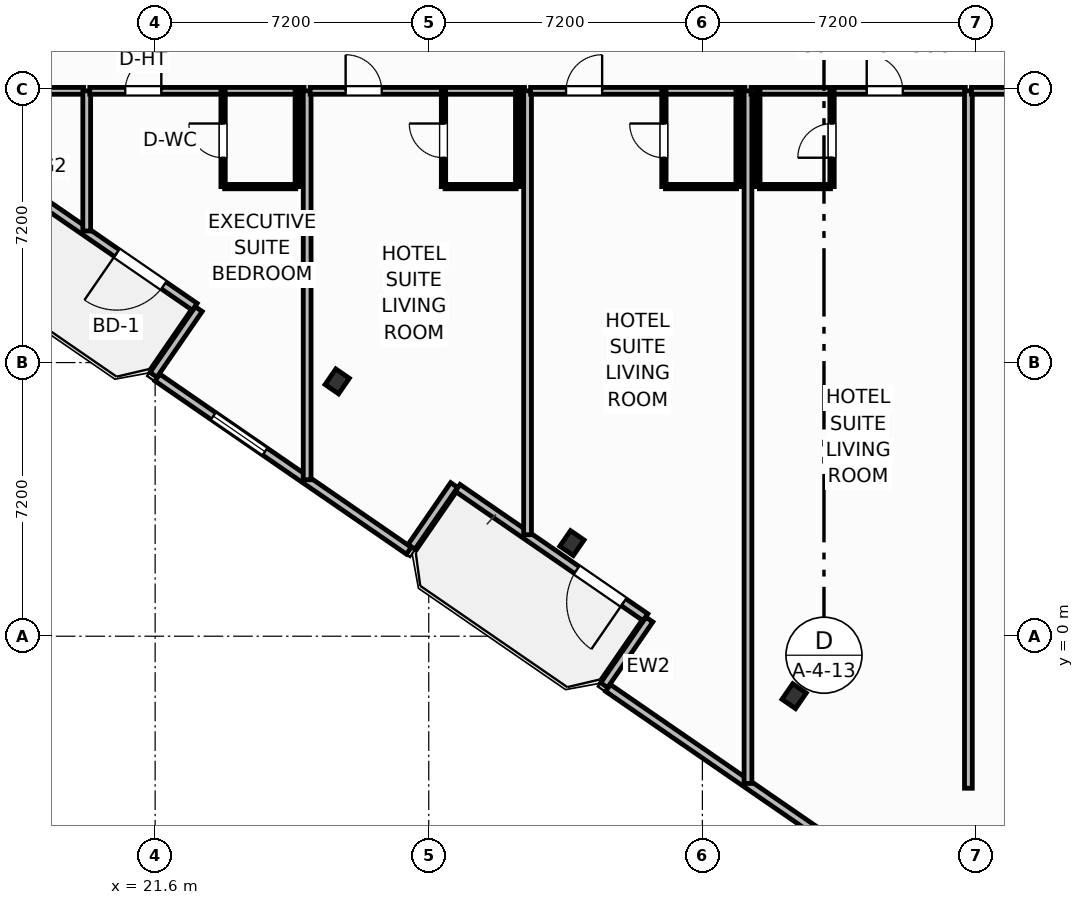
"""IFC4 building model, lengths in metres.
Left out: names, types, materials, properties, quantities, classifications, styles, units other than length and angle.
Written with IfcOpenShell. Run it as: python <this file> out.ifc"""

import sys

from ifc_helpers import new_model, si_unit, direction, frame, frame_2d, origin, origin_2d, place, context, subcontext, project, spatial, rectangle, i_section, extrude, element, fill, save


model = new_model("IFC4")
c1 = context("Model", 3, precision=1e-05, world=origin(), true_north=direction((0.0, 1.0)))
c2 = subcontext(c1, "Body", "Model", "MODEL_VIEW")
j1 = project(units=[si_unit("LENGTHUNIT", "METRE"), si_unit("PLANEANGLEUNIT", "RADIAN")], contexts=[c1])
p1 = place(None, origin())
s1 = spatial("IfcSite", under=j1, at=p1, CompositionType="ELEMENT")
p2 = place(p1, origin())
s2 = spatial("IfcBuilding", under=s1, at=p2, CompositionType="ELEMENT")
p3 = place(p2, frame((0.0, 0.0, 64.0)))
s3 = spatial("IfcBuildingStorey", under=s2, at=p3, CompositionType="ELEMENT", Elevation=64.0)
for number, where, z_axis, x_axis in (
    (1, (26.391, 6.705, 0.0), (0.0, 0.0, 1.0), (0.824, -0.567, 0.0)),
    (2, (32.568, 2.45, 0.0), (0.0, 0.0, 1.0), (0.824, -0.567, 0.0)),
    (3, (38.415, -1.577, 0.0), (0.0, 0.0, 1.0), (0.824, -0.567, 0.0)),
):
    element("IfcColumn", number, at=place(p3, frame(where, z_axis=z_axis, x_axis=x_axis)), inside=s3, PredefinedType="COLUMN", context=c2, shape_type="SweptSolid", body=[
        extrude(i_section(OverallWidth=0.432, OverallDepth=0.498, WebThickness=0.056, FlangeThickness=0.089, FilletRadius=0.025, at=origin_2d()), origin(), (0.0, 0.0, 1.0), 3.7),
    ])
p4 = place(p3, frame((22.643, 8.667, 0.0), z_axis=(0.0, 0.0, 1.0), x_axis=(-0.823534636215, 0.567265989598, 0.0)))
e4 = element("IfcWall", 4, at=p4, inside=s3, PredefinedType="SOLIDWALL", context=c2, shape_type="SweptSolid", body=[
    extrude(rectangle(XDim=6.0, YDim=0.22, at=frame_2d((3.0, 0.0))), origin(), (0.0, 0.0, 1.0), 2.73),
])
p5 = place(p4, frame((0.992, 0.0, 0.0)))
e5 = element("IfcOpeningElement", 5, at=p5, cuts=e4, PredefinedType="OPENING", context=c2, shape_type="SweptSolid", body=[
    extrude(rectangle(XDim=1.5, YDim=2.25, at=frame_2d((0.75, 1.125))), frame((0.0, 0.12, 0.0), z_axis=(0.0, -1.0, 0.0), x_axis=(1.0, 0.0, 0.0)), (0.0, 0.0, 1.0), 0.24),
])
p6 = place(p3, frame((34.502, 0.499, 0.0), z_axis=(0.0, 0.0, 1.0), x_axis=(-0.823534636215, 0.567265989598, 0.0)))
e6 = element("IfcWall", 6, at=p6, inside=s3, PredefinedType="SOLIDWALL", context=c2, shape_type="SweptSolid", body=[
    extrude(rectangle(XDim=6.0, YDim=0.22, at=frame_2d((3.0, 0.0))), origin(), (0.0, 0.0, 1.0), 2.73),
])
p7 = place(p6, frame((0.696, 0.0, 0.0)))
e7 = element("IfcOpeningElement", 7, at=p7, cuts=e6, PredefinedType="OPENING", context=c2, shape_type="SweptSolid", body=[
    extrude(rectangle(XDim=1.5, YDim=2.25, at=frame_2d((0.75, 1.125))), frame((0.0, 0.12, 0.0), z_axis=(0.0, -1.0, 0.0), x_axis=(1.0, 0.0, 0.0)), (0.0, 0.0, 1.0), 0.24),
])
p8 = place(p3, frame((22.747, 8.607, 0.0), z_axis=(0.0, 0.0, 1.0), x_axis=(-0.567219383419, -0.823566737474, 0.0)))
e8 = element("IfcWall", 8, at=p8, inside=s3, PredefinedType="SOLIDWALL", context=c2, shape_type="SweptSolid", body=[
    extrude(rectangle(XDim=2.1, YDim=0.22, at=frame_2d((1.05, 0.0))), origin(), (0.0, 0.0, 1.0), 2.73),
])
p9 = place(p3, frame((21.659, 6.807, 0.0), z_axis=(0.0, 0.0, 1.0), x_axis=(0.823535360023, -0.567264938799, 0.0)))
e9 = element("IfcWall", 9, at=p9, inside=s3, PredefinedType="SOLIDWALL", context=c2, shape_type="SweptSolid", body=[
    extrude(rectangle(XDim=8.035, YDim=0.22, at=frame_2d((4.018, 0.0))), origin(), (0.0, 0.0, 1.0), 2.73),
])
p10 = place(p9, frame((1.788, 0.0, 0.8)))
e10 = element("IfcOpeningElement", 10, at=p10, cuts=e9, PredefinedType="OPENING", context=c2, shape_type="SweptSolid", body=[
    extrude(rectangle(XDim=1.65, YDim=1.65, at=frame_2d((0.825, 0.825))), frame((0.0, 0.12, 0.0), z_axis=(0.0, -1.0, 0.0), x_axis=(1.0, 0.0, 0.0)), (0.0, 0.0, 1.0), 0.24),
])
p11 = place(p3, frame((28.347, 2.352, 0.0), z_axis=(0.0, 0.0, 1.0), x_axis=(0.567215821234, 0.823569190865, 0.0)))
e11 = element("IfcWall", 11, at=p11, inside=s3, PredefinedType="SOLIDWALL", context=c2, shape_type="SweptSolid", body=[
    extrude(rectangle(XDim=1.975, YDim=0.22, at=frame_2d((0.988, 0.0))), origin(), (0.0, 0.0, 1.0), 2.73),
])
p12 = place(p3, frame((34.606, 0.439, 0.0), z_axis=(0.0, 0.0, 1.0), x_axis=(-0.567219383419, -0.823566737474, 0.0)))
e12 = element("IfcWall", 12, at=p12, inside=s3, PredefinedType="SOLIDWALL", context=c2, shape_type="SweptSolid", body=[
    extrude(rectangle(XDim=2.1, YDim=0.22, at=frame_2d((1.05, 0.0))), origin(), (0.0, 0.0, 1.0), 2.73),
])
p13 = place(p3, frame((33.518, -1.362, 0.0), z_axis=(0.0, 0.0, 1.0), x_axis=(0.82353935489, -0.567259139148, 0.0)))
e13 = element("IfcWall", 13, at=p13, inside=s3, PredefinedType="SOLIDWALL", context=c2, shape_type="SweptSolid", body=[
    extrude(rectangle(XDim=23.147, YDim=0.22, at=frame_2d((11.573, 0.0))), origin(), (0.0, 0.0, 1.0), 2.73),
])
p14 = place(p13, frame((10.749, 0.0, 0.8)))
e14 = element("IfcOpeningElement", 14, at=p14, cuts=e13, PredefinedType="OPENING", context=c2, shape_type="SweptSolid", body=[
    extrude(rectangle(XDim=1.65, YDim=1.65, at=frame_2d((0.825, 0.825))), frame((0.0, 0.12, 0.0), z_axis=(0.0, -1.0, 0.0), x_axis=(1.0, 0.0, 0.0)), (0.0, 0.0, 1.0), 0.24),
])
p15 = place(p3, frame((14.08, 14.35, 0.0), z_axis=(0.0, 0.0, 1.0), x_axis=(1.0, 0.0, 0.0)))
e15 = element("IfcWall", 15, at=p15, inside=s3, PredefinedType="PARTITIONING", context=c2, shape_type="SweptSolid", body=[
    extrude(rectangle(XDim=5.64, YDim=0.18, at=frame_2d((2.82, 0.0))), origin(), (0.0, 0.0, 1.0), 3.45),
])
p16 = place(p15, frame((3.195, 0.0, 0.0)))
e16 = element("IfcOpeningElement", 16, at=p16, cuts=e15, PredefinedType="OPENING", context=c2, shape_type="SweptSolid", body=[
    extrude(rectangle(XDim=0.95, YDim=2.05, at=frame_2d((0.475, 1.025))), frame((0.0, 0.1, 0.0), z_axis=(0.0, -1.0, 0.0), x_axis=(1.0, 0.0, 0.0)), (0.0, 0.0, 1.0), 0.2),
])
p17 = place(p3, frame((19.8, 10.662, 0.0), z_axis=(0.0, 0.0, 1.0), x_axis=(0.0, 1.0, 0.0)))
e17 = element("IfcWall", 17, at=p17, inside=s3, PredefinedType="PARTITIONING", context=c2, shape_type="SweptSolid", body=[
    extrude(rectangle(XDim=3.688, YDim=0.205, at=frame_2d((1.844, 0.0))), origin(), (0.0, 0.0, 1.0), 3.45),
])
p18 = place(p3, frame((19.88, 14.35, 0.0), z_axis=(0.0, 0.0, 1.0), x_axis=(1.0, 0.0, 0.0)))
e18 = element("IfcWall", 18, at=p18, inside=s3, PredefinedType="PARTITIONING", context=c2, shape_type="SweptSolid", body=[
    extrude(rectangle(XDim=5.64, YDim=0.18, at=frame_2d((2.82, 0.0))), origin(), (0.0, 0.0, 1.0), 3.45),
])
p19 = place(p18, frame((0.933, 0.0, 0.0)))
e19 = element("IfcOpeningElement", 19, at=p19, cuts=e18, PredefinedType="OPENING", context=c2, shape_type="SweptSolid", body=[
    extrude(rectangle(XDim=0.95, YDim=2.15, at=frame_2d((0.475, 1.075))), frame((0.0, 0.1, 0.0), z_axis=(0.0, -1.0, 0.0), x_axis=(1.0, 0.0, 0.0)), (0.0, 0.0, 1.0), 0.2),
])
p20 = place(p3, frame((23.428, 11.83, 0.0), z_axis=(0.0, 0.0, 1.0), x_axis=(1.0, 0.0, 0.0)))
e20 = element("IfcWall", 20, at=p20, inside=s3, PredefinedType="PARTITIONING", context=c2, shape_type="SweptSolid", body=[
    extrude(rectangle(XDim=1.872, YDim=0.115, at=frame_2d((0.936, 0.0))), origin(), (0.0, 0.0, 1.0), 3.45),
])
p21 = place(p3, frame((23.388, 11.83, 0.0), z_axis=(0.0, 0.0, 1.0), x_axis=(0.0, 1.0, 0.0)))
e21 = element("IfcWall", 21, at=p21, inside=s3, PredefinedType="PARTITIONING", context=c2, shape_type="SweptSolid", body=[
    extrude(rectangle(XDim=2.52, YDim=0.115, at=frame_2d((1.26, 0.0))), origin(), (0.0, 0.0, 1.0), 3.45),
])
p22 = place(p21, frame((0.76, 0.0, 0.0)))
e22 = element("IfcOpeningElement", 22, at=p22, cuts=e21, PredefinedType="OPENING", context=c2, shape_type="SweptSolid", body=[
    extrude(rectangle(XDim=0.9, YDim=2.05, at=frame_2d((0.45, 1.025))), frame((0.0, 0.067, 0.0), z_axis=(0.0, -1.0, 0.0), x_axis=(1.0, 0.0, 0.0)), (0.0, 0.0, 1.0), 0.135),
])
p23 = place(p3, frame((25.34, 11.83, 0.0), z_axis=(0.0, 0.0, 1.0), x_axis=(0.0, 1.0, 0.0)))
e23 = element("IfcWall", 23, at=p23, inside=s3, PredefinedType="PARTITIONING", context=c2, shape_type="SweptSolid", body=[
    extrude(rectangle(XDim=2.52, YDim=0.115, at=frame_2d((1.26, 0.0))), origin(), (0.0, 0.0, 1.0), 2.58),
])
p24 = place(p3, frame((25.6, 4.117, 0.0), z_axis=(0.0, 0.0, 1.0), x_axis=(0.0, 1.0, 0.0)))
e24 = element("IfcWall", 24, at=p24, inside=s3, PredefinedType="PARTITIONING", context=c2, shape_type="SweptSolid", body=[
    extrude(rectangle(XDim=10.233, YDim=0.205, at=frame_2d((5.117, 0.0))), origin(), (0.0, 0.0, 1.0), 2.58),
])
p25 = place(p3, frame((25.68, 14.35, 0.0), z_axis=(0.0, 0.0, 1.0), x_axis=(1.0, 0.0, 0.0)))
e25 = element("IfcWall", 25, at=p25, inside=s3, PredefinedType="PARTITIONING", context=c2, shape_type="SweptSolid", body=[
    extrude(rectangle(XDim=5.64, YDim=0.18, at=frame_2d((2.82, 0.0))), origin(), (0.0, 0.0, 1.0), 3.45),
])
p26 = place(p25, frame((0.933, 0.0, 0.0)))
e26 = element("IfcOpeningElement", 26, at=p26, cuts=e25, PredefinedType="OPENING", context=c2, shape_type="SweptSolid", body=[
    extrude(rectangle(XDim=0.95, YDim=2.15, at=frame_2d((0.475, 1.075))), frame((0.0, 0.1, 0.0), z_axis=(0.0, -1.0, 0.0), x_axis=(1.0, 0.0, 0.0)), (0.0, 0.0, 1.0), 0.2),
])
p27 = place(p3, frame((29.228, 11.83, 0.0), z_axis=(0.0, 0.0, 1.0), x_axis=(1.0, 0.0, 0.0)))
e27 = element("IfcWall", 27, at=p27, inside=s3, PredefinedType="PARTITIONING", context=c2, shape_type="SweptSolid", body=[
    extrude(rectangle(XDim=1.872, YDim=0.115, at=frame_2d((0.936, 0.0))), origin(), (0.0, 0.0, 1.0), 3.45),
])
p28 = place(p3, frame((29.188, 11.83, 0.0), z_axis=(0.0, 0.0, 1.0), x_axis=(0.0, 1.0, 0.0)))
e28 = element("IfcWall", 28, at=p28, inside=s3, PredefinedType="PARTITIONING", context=c2, shape_type="SweptSolid", body=[
    extrude(rectangle(XDim=2.52, YDim=0.115, at=frame_2d((1.26, 0.0))), origin(), (0.0, 0.0, 1.0), 3.45),
])
p29 = place(p28, frame((0.76, 0.0, 0.0)))
e29 = element("IfcOpeningElement", 29, at=p29, cuts=e28, PredefinedType="OPENING", context=c2, shape_type="SweptSolid", body=[
    extrude(rectangle(XDim=0.9, YDim=2.05, at=frame_2d((0.45, 1.025))), frame((0.0, 0.067, 0.0), z_axis=(0.0, -1.0, 0.0), x_axis=(1.0, 0.0, 0.0)), (0.0, 0.0, 1.0), 0.135),
])
p30 = place(p3, frame((31.14, 11.83, 0.0), z_axis=(0.0, 0.0, 1.0), x_axis=(0.0, 1.0, 0.0)))
e30 = element("IfcWall", 30, at=p30, inside=s3, PredefinedType="PARTITIONING", context=c2, shape_type="SweptSolid", body=[
    extrude(rectangle(XDim=2.52, YDim=0.115, at=frame_2d((1.26, 0.0))), origin(), (0.0, 0.0, 1.0), 3.45),
])
p31 = place(p3, frame((31.4, 2.671, 0.0), z_axis=(0.0, 0.0, 1.0), x_axis=(0.0, 1.0, 0.0)))
e31 = element("IfcWall", 31, at=p31, inside=s3, PredefinedType="PARTITIONING", context=c2, shape_type="SweptSolid", body=[
    extrude(rectangle(XDim=11.679, YDim=0.205, at=frame_2d((5.839, 0.0))), origin(), (0.0, 0.0, 1.0), 3.45),
])
p32 = place(p3, frame((31.48, 14.35, 0.0), z_axis=(0.0, 0.0, 1.0), x_axis=(1.0, 0.0, 0.0)))
e32 = element("IfcWall", 32, at=p32, inside=s3, PredefinedType="PARTITIONING", context=c2, shape_type="SweptSolid", body=[
    extrude(rectangle(XDim=5.64, YDim=0.18, at=frame_2d((2.82, 0.0))), origin(), (0.0, 0.0, 1.0), 3.45),
])
p33 = place(p32, frame((0.933, 0.0, 0.0)))
e33 = element("IfcOpeningElement", 33, at=p33, cuts=e32, PredefinedType="OPENING", context=c2, shape_type="SweptSolid", body=[
    extrude(rectangle(XDim=0.95, YDim=2.15, at=frame_2d((0.475, 1.075))), frame((0.0, 0.1, 0.0), z_axis=(0.0, -1.0, 0.0), x_axis=(1.0, 0.0, 0.0)), (0.0, 0.0, 1.0), 0.2),
])
p34 = place(p3, frame((35.028, 11.83, 0.0), z_axis=(0.0, 0.0, 1.0), x_axis=(1.0, 0.0, 0.0)))
e34 = element("IfcWall", 34, at=p34, inside=s3, PredefinedType="PARTITIONING", context=c2, shape_type="SweptSolid", body=[
    extrude(rectangle(XDim=1.872, YDim=0.115, at=frame_2d((0.936, 0.0))), origin(), (0.0, 0.0, 1.0), 3.45),
])
p35 = place(p3, frame((34.988, 11.83, 0.0), z_axis=(0.0, 0.0, 1.0), x_axis=(0.0, 1.0, 0.0)))
e35 = element("IfcWall", 35, at=p35, inside=s3, PredefinedType="PARTITIONING", context=c2, shape_type="SweptSolid", body=[
    extrude(rectangle(XDim=2.52, YDim=0.115, at=frame_2d((1.26, 0.0))), origin(), (0.0, 0.0, 1.0), 3.45),
])
p36 = place(p35, frame((0.76, 0.0, 0.0)))
e36 = element("IfcOpeningElement", 36, at=p36, cuts=e35, PredefinedType="OPENING", context=c2, shape_type="SweptSolid", body=[
    extrude(rectangle(XDim=0.9, YDim=2.05, at=frame_2d((0.45, 1.025))), frame((0.0, 0.067, 0.0), z_axis=(0.0, -1.0, 0.0), x_axis=(1.0, 0.0, 0.0)), (0.0, 0.0, 1.0), 0.135),
])
p37 = place(p3, frame((36.94, 11.83, 0.0), z_axis=(0.0, 0.0, 1.0), x_axis=(0.0, 1.0, 0.0)))
e37 = element("IfcWall", 37, at=p37, inside=s3, PredefinedType="PARTITIONING", context=c2, shape_type="SweptSolid", body=[
    extrude(rectangle(XDim=2.52, YDim=0.115, at=frame_2d((1.26, 0.0))), origin(), (0.0, 0.0, 1.0), 3.45),
])
p38 = place(p3, frame((37.2, -3.874, 0.0), z_axis=(0.0, 0.0, 1.0), x_axis=(0.0, 1.0, 0.0)))
e38 = element("IfcWall", 38, at=p38, inside=s3, PredefinedType="PARTITIONING", context=c2, shape_type="SweptSolid", body=[
    extrude(rectangle(XDim=18.224, YDim=0.205, at=frame_2d((9.112, 0.0))), origin(), (0.0, 0.0, 1.0), 3.45),
])
p39 = place(p3, frame((37.28, 14.35, 0.0), z_axis=(0.0, 0.0, 1.0), x_axis=(1.0, 0.0, 0.0)))
e39 = element("IfcWall", 39, at=p39, inside=s3, PredefinedType="PARTITIONING", context=c2, shape_type="SweptSolid", body=[
    extrude(rectangle(XDim=5.64, YDim=0.18, at=frame_2d((2.82, 0.0))), origin(), (0.0, 0.0, 1.0), 3.45),
])
p40 = place(p39, frame((3.045, 0.0, 0.0)))
e40 = element("IfcOpeningElement", 40, at=p40, cuts=e39, PredefinedType="OPENING", context=c2, shape_type="SweptSolid", body=[
    extrude(rectangle(XDim=0.95, YDim=2.15, at=frame_2d((0.475, 1.075))), frame((0.0, 0.1, 0.0), z_axis=(0.0, -1.0, 0.0), x_axis=(1.0, 0.0, 0.0)), (0.0, 0.0, 1.0), 0.2),
])
p41 = place(p3, frame((37.5, 11.83, 0.0), z_axis=(0.0, 0.0, 1.0), x_axis=(1.0, 0.0, 0.0)))
e41 = element("IfcWall", 41, at=p41, inside=s3, PredefinedType="PARTITIONING", context=c2, shape_type="SweptSolid", body=[
    extrude(rectangle(XDim=1.872, YDim=0.115, at=frame_2d((0.936, 0.0))), origin(), (0.0, 0.0, 1.0), 3.45),
])
p42 = place(p3, frame((39.412, 11.83, 0.0), z_axis=(0.0, 0.0, 1.0), x_axis=(0.0, 1.0, 0.0)))
e42 = element("IfcWall", 42, at=p42, inside=s3, PredefinedType="PARTITIONING", context=c2, shape_type="SweptSolid", body=[
    extrude(rectangle(XDim=2.52, YDim=0.115, at=frame_2d((1.26, 0.0))), origin(), (0.0, 0.0, 1.0), 3.45),
])
p43 = place(p42, frame((0.76, 0.0, 0.0)))
e43 = element("IfcOpeningElement", 43, at=p43, cuts=e42, PredefinedType="OPENING", context=c2, shape_type="SweptSolid", body=[
    extrude(rectangle(XDim=0.9, YDim=2.05, at=frame_2d((0.45, 1.025))), frame((0.0, 0.067, 0.0), z_axis=(0.0, -1.0, 0.0), x_axis=(1.0, 0.0, 0.0)), (0.0, 0.0, 1.0), 0.135),
])
p44 = place(p3, frame((37.46, 11.83, 0.0), z_axis=(0.0, 0.0, 1.0), x_axis=(0.0, 1.0, 0.0)))
e44 = element("IfcWall", 44, at=p44, inside=s3, PredefinedType="PARTITIONING", context=c2, shape_type="SweptSolid", body=[
    extrude(rectangle(XDim=2.52, YDim=0.115, at=frame_2d((1.26, 0.0))), origin(), (0.0, 0.0, 1.0), 3.45),
])
p45 = place(p3, frame((43.0, -4.0, 0.0), z_axis=(0.0, 0.0, 1.0), x_axis=(0.0, 1.0, 0.0)))
e45 = element("IfcWall", 45, at=p45, inside=s3, PredefinedType="PARTITIONING", context=c2, shape_type="SweptSolid", body=[
    extrude(rectangle(XDim=18.35, YDim=0.205, at=frame_2d((9.175, 0.0))), origin(), (0.0, 0.0, 1.0), 2.58),
])
p46 = place(p3, frame((43.08, 14.35, 0.0), z_axis=(0.0, 0.0, 1.0), x_axis=(1.0, 0.0, 0.0)))
e46 = element("IfcWall", 46, at=p46, inside=s3, PredefinedType="PARTITIONING", context=c2, shape_type="SweptSolid", body=[
    extrude(rectangle(XDim=5.64, YDim=0.18, at=frame_2d((2.82, 0.0))), origin(), (0.0, 0.0, 1.0), 3.45),
])
p47 = place(p46, frame((0.933, 0.0, 0.0)))
e47 = element("IfcOpeningElement", 47, at=p47, cuts=e46, PredefinedType="OPENING", context=c2, shape_type="SweptSolid", body=[
    extrude(rectangle(XDim=0.95, YDim=2.15, at=frame_2d((0.475, 1.075))), frame((0.0, 0.1, 0.0), z_axis=(0.0, -1.0, 0.0), x_axis=(1.0, 0.0, 0.0)), (0.0, 0.0, 1.0), 0.2),
])
p48 = place(p5, origin())
e48 = element("IfcDoor", 48, at=p48, inside=s3, OperationType="SINGLE_SWING_RIGHT", PredefinedType="DOOR", context=c2, shape_type="SweptSolid", body=[
    extrude(rectangle(XDim=1.5, YDim=2.25, at=frame_2d((0.75, 1.125))), frame((0.0, 0.025, 0.0), z_axis=(0.0, -1.0, 0.0), x_axis=(1.0, 0.0, 0.0)), (0.0, 0.0, 1.0), 0.05),
])
fill(e5, e48)
p49 = place(p7, origin())
e49 = element("IfcDoor", 49, at=p49, inside=s3, OperationType="SINGLE_SWING_LEFT", PredefinedType="DOOR", context=c2, shape_type="SweptSolid", body=[
    extrude(rectangle(XDim=1.5, YDim=2.25, at=frame_2d((0.75, 1.125))), frame((0.0, 0.025, 0.0), z_axis=(0.0, -1.0, 0.0), x_axis=(1.0, 0.0, 0.0)), (0.0, 0.0, 1.0), 0.05),
])
fill(e7, e49)
p50 = place(p10, origin())
e50 = element("IfcWindow", 50, at=p50, inside=s3, PartitioningType="SINGLE_PANEL", PredefinedType="WINDOW", context=c2, shape_type="SweptSolid", body=[
    extrude(rectangle(XDim=1.65, YDim=1.65, at=frame_2d((0.825, 0.825))), frame((0.0, 0.03, 0.0), z_axis=(0.0, -1.0, 0.0), x_axis=(1.0, 0.0, 0.0)), (0.0, 0.0, 1.0), 0.06),
])
fill(e10, e50)
p51 = place(p19, origin())
e51 = element("IfcDoor", 51, at=p51, inside=s3, OperationType="SINGLE_SWING_RIGHT", PredefinedType="DOOR", context=c2, shape_type="SweptSolid", body=[
    extrude(rectangle(XDim=0.95, YDim=2.15, at=frame_2d((0.475, 1.075))), frame((0.0, 0.025, 0.0), z_axis=(0.0, -1.0, 0.0), x_axis=(1.0, 0.0, 0.0)), (0.0, 0.0, 1.0), 0.05),
])
fill(e19, e51)
p52 = place(p22, origin())
e52 = element("IfcDoor", 52, at=p52, inside=s3, OperationType="SINGLE_SWING_RIGHT", PredefinedType="DOOR", context=c2, shape_type="SweptSolid", body=[
    extrude(rectangle(XDim=0.9, YDim=2.05, at=frame_2d((0.45, 1.025))), frame((0.0, 0.025, 0.0), z_axis=(0.0, -1.0, 0.0), x_axis=(1.0, 0.0, 0.0)), (0.0, 0.0, 1.0), 0.05),
])
fill(e22, e52)
p53 = place(p26, origin())
e53 = element("IfcDoor", 53, at=p53, inside=s3, OperationType="SINGLE_SWING_LEFT", PredefinedType="DOOR", context=c2, shape_type="SweptSolid", body=[
    extrude(rectangle(XDim=0.95, YDim=2.15, at=frame_2d((0.475, 1.075))), frame((0.0, 0.025, 0.0), z_axis=(0.0, -1.0, 0.0), x_axis=(1.0, 0.0, 0.0)), (0.0, 0.0, 1.0), 0.05),
])
fill(e26, e53)
p54 = place(p29, origin())
e54 = element("IfcDoor", 54, at=p54, inside=s3, OperationType="SINGLE_SWING_RIGHT", PredefinedType="DOOR", context=c2, shape_type="SweptSolid", body=[
    extrude(rectangle(XDim=0.9, YDim=2.05, at=frame_2d((0.45, 1.025))), frame((0.0, 0.025, 0.0), z_axis=(0.0, -1.0, 0.0), x_axis=(1.0, 0.0, 0.0)), (0.0, 0.0, 1.0), 0.05),
])
fill(e29, e54)
p55 = place(p33, origin())
e55 = element("IfcDoor", 55, at=p55, inside=s3, OperationType="SINGLE_SWING_RIGHT", PredefinedType="DOOR", context=c2, shape_type="SweptSolid", body=[
    extrude(rectangle(XDim=0.95, YDim=2.15, at=frame_2d((0.475, 1.075))), frame((0.0, 0.025, 0.0), z_axis=(0.0, -1.0, 0.0), x_axis=(1.0, 0.0, 0.0)), (0.0, 0.0, 1.0), 0.05),
])
fill(e33, e55)
p56 = place(p36, origin())
e56 = element("IfcDoor", 56, at=p56, inside=s3, OperationType="SINGLE_SWING_RIGHT", PredefinedType="DOOR", context=c2, shape_type="SweptSolid", body=[
    extrude(rectangle(XDim=0.9, YDim=2.05, at=frame_2d((0.45, 1.025))), frame((0.0, 0.025, 0.0), z_axis=(0.0, -1.0, 0.0), x_axis=(1.0, 0.0, 0.0)), (0.0, 0.0, 1.0), 0.05),
])
fill(e36, e56)
p57 = place(p40, origin())
e57 = element("IfcDoor", 57, at=p57, inside=s3, OperationType="SINGLE_SWING_LEFT", PredefinedType="DOOR", context=c2, shape_type="SweptSolid", body=[
    extrude(rectangle(XDim=0.95, YDim=2.15, at=frame_2d((0.475, 1.075))), frame((0.0, 0.025, 0.0), z_axis=(0.0, -1.0, 0.0), x_axis=(1.0, 0.0, 0.0)), (0.0, 0.0, 1.0), 0.05),
])
fill(e40, e57)
p58 = place(p43, origin())
e58 = element("IfcDoor", 58, at=p58, inside=s3, OperationType="SINGLE_SWING_LEFT", PredefinedType="DOOR", context=c2, shape_type="SweptSolid", body=[
    extrude(rectangle(XDim=0.9, YDim=2.05, at=frame_2d((0.45, 1.025))), frame((0.0, 0.025, 0.0), z_axis=(0.0, -1.0, 0.0), x_axis=(1.0, 0.0, 0.0)), (0.0, 0.0, 1.0), 0.05),
])
fill(e43, e58)
save(model, sys.argv[1])
